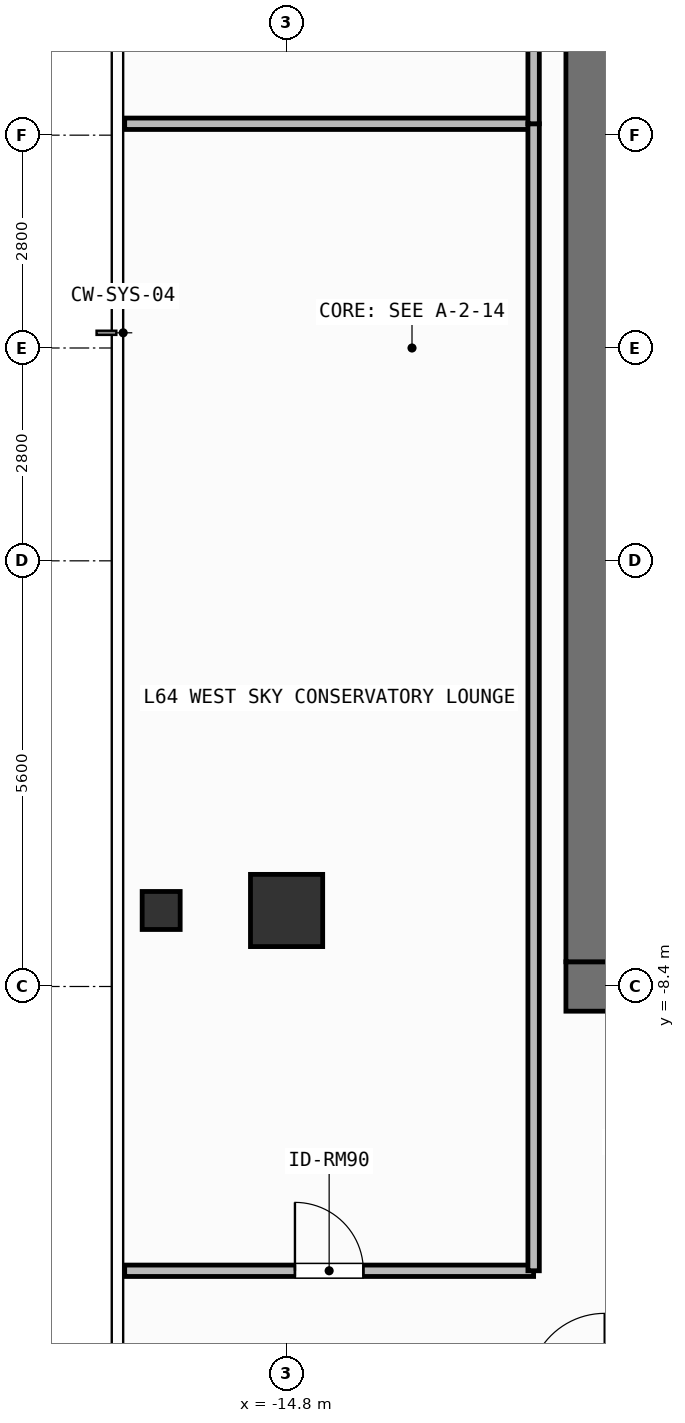
"""IFC4 building model, lengths in metres.
Left out: names, types, materials, properties, quantities, classifications, styles, units other than length and angle.
Written with IfcOpenShell. Run it as: python <this file> out.ifc"""

import sys

from ifc_helpers import new_model, si_unit, direction, frame, frame_2d, origin, origin_2d, place, context, subcontext, project, spatial, rectangle, hollow_rectangle, extrude, element, fill, save


model = new_model("IFC4")
c1 = context("Model", 3, precision=1e-05, world=origin(), true_north=direction((0.0, 1.0)))
c2 = subcontext(c1, "Body", "Model", "MODEL_VIEW")
j1 = project(units=[si_unit("LENGTHUNIT", "METRE"), si_unit("PLANEANGLEUNIT", "RADIAN")], contexts=[c1])
p1 = place(None, origin())
s1 = spatial("IfcSite", under=j1, at=p1, CompositionType="ELEMENT")
p2 = place(p1, origin())
s2 = spatial("IfcBuilding", under=s1, at=p2, CompositionType="ELEMENT")
p3 = place(p2, frame((0.0, 0.0, 262.5)))
s3 = spatial("IfcBuildingStorey", under=s2, at=p3, CompositionType="ELEMENT", Elevation=262.5)
p4 = place(p3, frame((-11.125, -8.4, 0.0), z_axis=(0.0, 0.0, 1.0), x_axis=(1.0, 0.0, 0.0)))
e1 = element("IfcWall", 1, at=p4, inside=s3, PredefinedType="SHEAR", context=c2, shape_type="SweptSolid", body=[
    extrude(rectangle(XDim=1.425, YDim=0.65, at=frame_2d((0.712, 0.0))), origin(), (0.0, 0.0, 1.0), 3.9),
])
p5 = place(p3, frame((-10.8, -8.075, 0.0), z_axis=(0.0, 0.0, 1.0), x_axis=(0.0, 1.0, 0.0)))
e2 = element("IfcWall", 2, at=p5, inside=s3, PredefinedType="SHEAR", context=c2, shape_type="SweptSolid", body=[
    extrude(rectangle(XDim=16.15, YDim=0.65, at=frame_2d((8.075, 0.0))), origin(), (0.0, 0.0, 1.0), 3.9),
])
p6 = place(p3, frame((-14.8, -7.4, 0.0), z_axis=(0.0, 0.0, 1.0), x_axis=(1.0, 0.0, 0.0)))
e3 = element("IfcColumn", 3, at=p6, inside=s3, PredefinedType="COLUMN", context=c2, shape_type="SweptSolid", body=[
    extrude(rectangle(XDim=0.95, YDim=0.95, at=origin_2d()), origin(), (0.0, 0.0, 1.0), 3.9),
])
p7 = place(p3, frame((-16.45, -7.4, 0.0), z_axis=(0.0, 0.0, 1.0), x_axis=(1.0, 0.0, 0.0)))
e4 = element("IfcColumn", 4, at=p7, inside=s3, PredefinedType="COLUMN", context=c2, shape_type="SweptSolid", body=[
    extrude(hollow_rectangle(XDim=0.5, YDim=0.5, WallThickness=0.025, at=origin_2d()), origin(), (0.0, 0.0, 1.0), 3.9),
])
p8 = place(p3, frame((-16.93, -12.14, 0.0), z_axis=(0.0, 0.0, 1.0), x_axis=(1.0, 0.0, 0.0)))
e5 = element("IfcWall", 5, at=p8, inside=s3, PredefinedType="PARTITIONING", context=c2, shape_type="SweptSolid", body=[
    extrude(rectangle(XDim=5.38, YDim=0.15, at=frame_2d((2.69, 0.0))), origin(), (0.0, 0.0, 1.0), 3.68),
])
p9 = place(p8, frame((2.24, 0.0, 0.0)))
e6 = element("IfcOpeningElement", 6, at=p9, cuts=e5, PredefinedType="OPENING", context=c2, shape_type="SweptSolid", body=[
    extrude(rectangle(XDim=0.9, YDim=2.1, at=frame_2d((0.45, 1.05))), frame((0.0, 0.085, 0.0), z_axis=(0.0, -1.0, 0.0), x_axis=(1.0, 0.0, 0.0)), (0.0, 0.0, 1.0), 0.17),
])
p10 = place(p3, frame((-16.93, 2.95, 0.0), z_axis=(0.0, 0.0, 1.0), x_axis=(1.0, 0.0, 0.0)))
e7 = element("IfcWall", 7, at=p10, inside=s3, PredefinedType="PARTITIONING", context=c2, shape_type="SweptSolid", body=[
    extrude(rectangle(XDim=5.38, YDim=0.15, at=frame_2d((2.69, 0.0))), origin(), (0.0, 0.0, 1.0), 3.68),
])
p11 = place(p3, frame((-11.55, -12.14, 0.0), z_axis=(0.0, 0.0, 1.0), x_axis=(0.0, 1.0, 0.0)))
e8 = element("IfcWall", 8, at=p11, inside=s3, PredefinedType="PARTITIONING", context=c2, shape_type="SweptSolid", body=[
    extrude(rectangle(XDim=15.09, YDim=0.15, at=frame_2d((7.545, 0.0))), origin(), (0.0, 0.0, 1.0), 3.68),
])
p12 = place(p3, frame((-11.55, 2.95, 0.0), z_axis=(0.0, 0.0, 1.0), x_axis=(0.0, 1.0, 0.0)))
e9 = element("IfcWall", 9, at=p12, inside=s3, PredefinedType="PARTITIONING", context=c2, shape_type="SweptSolid", body=[
    extrude(rectangle(XDim=9.19, YDim=0.15, at=frame_2d((4.595, 0.0))), origin(), (0.0, 0.0, 1.0), 3.68),
])
p13 = place(p9, origin())
e10 = element("IfcDoor", 10, at=p13, inside=s3, OperationType="SINGLE_SWING_LEFT", PredefinedType="DOOR", context=c2, shape_type="SweptSolid", body=[
    extrude(rectangle(XDim=0.9, YDim=2.1, at=frame_2d((0.45, 1.05))), frame((0.0, 0.025, 0.0), z_axis=(0.0, -1.0, 0.0), x_axis=(1.0, 0.0, 0.0)), (0.0, 0.0, 1.0), 0.05),
])
fill(e6, e10)
save(model, sys.argv[1])
